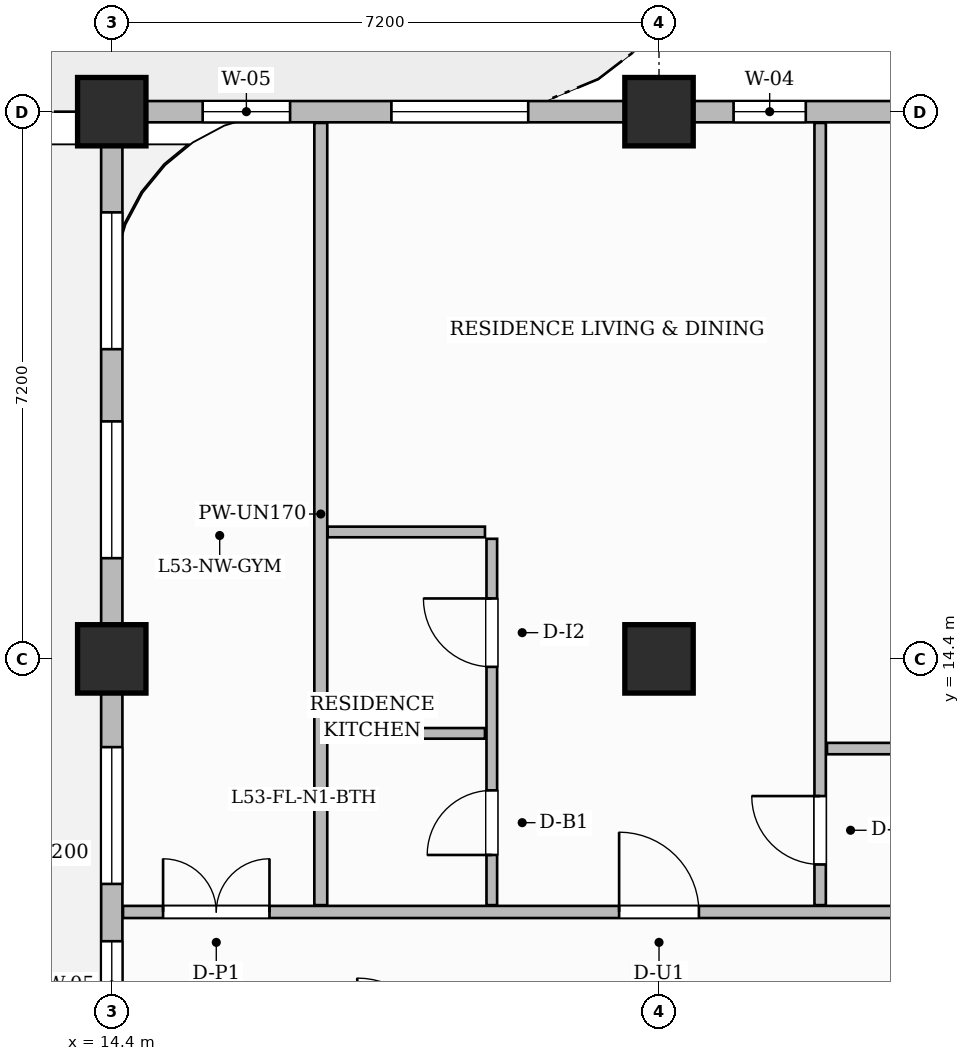
"""IFC4 building model, lengths in metres.
Left out: names, types, materials, properties, quantities, classifications, styles, units other than length and angle.
Written with IfcOpenShell. Run it as: python <this file> out.ifc"""

import sys

from ifc_helpers import new_model, si_unit, direction, frame, frame_2d, origin, origin_2d, place, context, subcontext, project, spatial, rectangle, extrude, source, transform, mapped, element, fill, save


model = new_model("IFC4")
c1 = context("Model", 3, precision=1e-05, world=origin(), true_north=direction((0.0, 1.0)))
c2 = subcontext(c1, "Body", "Model", "MODEL_VIEW")
j1 = project(units=[si_unit("LENGTHUNIT", "METRE"), si_unit("PLANEANGLEUNIT", "RADIAN")], contexts=[c1])
p1 = place(None, origin())
s1 = spatial("IfcSite", under=j1, at=p1, CompositionType="ELEMENT")
p2 = place(p1, origin())
s2 = spatial("IfcBuilding", under=s1, at=p2, CompositionType="ELEMENT")
p3 = place(p2, frame((0.0, 0.0, 213.45)))
s3 = spatial("IfcBuildingStorey", under=s2, at=p3, CompositionType="ELEMENT", Elevation=213.45)
m1 = source(origin(), c2, "Body", "SweptSolid", [
    extrude(rectangle(XDim=0.9, YDim=0.9, at=origin_2d()), origin(), (0.0, 0.0, 1.0), 3.85),
])
for number, where, z_axis, x_axis in (
    (1, (14.4, 14.4, 0.0), (0.0, 0.0, 1.0), (1.0, 0.0, 0.0)),
    (2, (14.4, 21.6, 0.0), (0.0, 0.0, 1.0), (1.0, 0.0, 0.0)),
    (3, (21.6, 14.4, 0.0), (0.0, 0.0, 1.0), (1.0, 0.0, 0.0)),
    (4, (21.6, 21.6, 0.0), (0.0, 0.0, 1.0), (1.0, 0.0, 0.0)),
):
    element("IfcColumn", number, at=place(p3, frame(where, z_axis=z_axis, x_axis=x_axis)), inside=s3, PredefinedType="COLUMN", context=c2, shape_type="MappedRepresentation", body=[
        mapped(m1, transform((0.0, 0.0, 0.0), scale=1.0)),
    ])
p4 = place(p3, frame((14.548, 11.07, 0.0), z_axis=(0.0, 0.0, 1.0), x_axis=(1.0, 0.0, 0.0)))
e5 = element("IfcWall", 5, at=p4, inside=s3, PredefinedType="PARTITIONING", context=c2, shape_type="SweptSolid", body=[
    extrude(rectangle(XDim=15.562, YDim=0.16, at=frame_2d((7.781, 0.0))), origin(), (0.0, 0.0, 1.0), 3.6),
])
p5 = place(p4, frame((0.527, 0.0, 0.0)))
e6 = element("IfcOpeningElement", 6, at=p5, cuts=e5, PredefinedType="OPENING", context=c2, shape_type="SweptSolid", body=[
    extrude(rectangle(XDim=1.4, YDim=2.35, at=frame_2d((0.7, 1.175))), frame((0.0, 0.09, 0.0), z_axis=(0.0, -1.0, 0.0), x_axis=(1.0, 0.0, 0.0)), (0.0, 0.0, 1.0), 0.18),
])
p6 = place(p4, frame((6.527, 0.0, 0.0)))
e7 = element("IfcOpeningElement", 7, at=p6, cuts=e5, PredefinedType="OPENING", context=c2, shape_type="SweptSolid", body=[
    extrude(rectangle(XDim=1.05, YDim=2.25, at=frame_2d((0.525, 1.125))), frame((0.0, 0.09, 0.0), z_axis=(0.0, -1.0, 0.0), x_axis=(1.0, 0.0, 0.0)), (0.0, 0.0, 1.0), 0.18),
])
p7 = place(p3, frame((17.15, 11.16, 0.0), z_axis=(0.0, 0.0, 1.0), x_axis=(0.0, 1.0, 0.0)))
e8 = element("IfcWall", 8, at=p7, inside=s3, PredefinedType="PARTITIONING", context=c2, shape_type="SweptSolid", body=[
    extrude(rectangle(XDim=10.292, YDim=0.17, at=frame_2d((5.146, 0.0))), origin(), (0.0, 0.0, 1.0), 3.6),
])
p8 = place(p3, frame((19.4, 11.16, 0.0), z_axis=(0.0, 0.0, 1.0), x_axis=(0.0, 1.0, 0.0)))
e9 = element("IfcWall", 9, at=p8, inside=s3, PredefinedType="PARTITIONING", context=c2, shape_type="SweptSolid", body=[
    extrude(rectangle(XDim=4.82, YDim=0.14, at=frame_2d((2.41, 0.0))), origin(), (0.0, 0.0, 1.0), 3.6),
])
p9 = place(p8, frame((0.66, 0.0, 0.0)))
e10 = element("IfcOpeningElement", 10, at=p9, cuts=e9, PredefinedType="OPENING", context=c2, shape_type="SweptSolid", body=[
    extrude(rectangle(XDim=0.85, YDim=2.1, at=frame_2d((0.425, 1.05))), frame((0.0, 0.08, 0.0), z_axis=(0.0, -1.0, 0.0), x_axis=(1.0, 0.0, 0.0)), (0.0, 0.0, 1.0), 0.16),
])
p10 = place(p8, frame((3.135, 0.0, 0.0)))
e11 = element("IfcOpeningElement", 11, at=p10, cuts=e9, PredefinedType="OPENING", context=c2, shape_type="SweptSolid", body=[
    extrude(rectangle(XDim=0.9, YDim=2.15, at=frame_2d((0.45, 1.075))), frame((0.0, 0.08, 0.0), z_axis=(0.0, -1.0, 0.0), x_axis=(1.0, 0.0, 0.0)), (0.0, 0.0, 1.0), 0.16),
])
for number, where, z_axis, x_axis in (
    (12, (17.24, 13.42, 0.0), (0.0, 0.0, 1.0), (1.0, 0.0, 0.0)),
    (13, (17.24, 16.07, 0.0), (0.0, 0.0, 1.0), (1.0, 0.0, 0.0)),
):
    element("IfcWall", number, at=place(p3, frame(where, z_axis=z_axis, x_axis=x_axis)), inside=s3, PredefinedType="PARTITIONING", context=c2, shape_type="SweptSolid", body=[
        extrude(rectangle(XDim=2.07, YDim=0.14, at=frame_2d((1.035, 0.0))), origin(), (0.0, 0.0, 1.0), 3.6),
    ])
p11 = place(p3, frame((23.72, 11.16, 0.0), z_axis=(0.0, 0.0, 1.0), x_axis=(0.0, 1.0, 0.0)))
e14 = element("IfcWall", 14, at=p11, inside=s3, PredefinedType="PARTITIONING", context=c2, shape_type="SweptSolid", body=[
    extrude(rectangle(XDim=10.292, YDim=0.15, at=frame_2d((5.146, 0.0))), origin(), (0.0, 0.0, 1.0), 3.6),
])
p12 = place(p11, frame((0.535, 0.0, 0.0)))
e15 = element("IfcOpeningElement", 15, at=p12, cuts=e14, PredefinedType="OPENING", context=c2, shape_type="SweptSolid", body=[
    extrude(rectangle(XDim=0.9, YDim=2.15, at=frame_2d((0.45, 1.075))), frame((0.0, 0.085, 0.0), z_axis=(0.0, -1.0, 0.0), x_axis=(1.0, 0.0, 0.0)), (0.0, 0.0, 1.0), 0.17),
])
p13 = place(p3, frame((23.81, 13.22, 0.0), z_axis=(0.0, 0.0, 1.0), x_axis=(1.0, 0.0, 0.0)))
e16 = element("IfcWall", 16, at=p13, inside=s3, PredefinedType="PARTITIONING", context=c2, shape_type="SweptSolid", body=[
    extrude(rectangle(XDim=6.3, YDim=0.15, at=frame_2d((3.15, 0.0))), origin(), (0.0, 0.0, 1.0), 3.6),
])
p14 = place(p13, frame((1.65, 0.0, 0.0)))
e17 = element("IfcOpeningElement", 17, at=p14, cuts=e16, PredefinedType="OPENING", context=c2, shape_type="SweptSolid", body=[
    extrude(rectangle(XDim=0.9, YDim=2.15, at=frame_2d((0.45, 1.075))), frame((0.0, 0.085, 0.0), z_axis=(0.0, -1.0, 0.0), x_axis=(1.0, 0.0, 0.0)), (0.0, 0.0, 1.0), 0.17),
])
p15 = place(p3, frame((14.4, 21.6, 0.0), z_axis=(0.0, 0.0, 1.0), x_axis=(1.0, 0.0, 0.0)))
e18 = element("IfcWall", 18, at=p15, inside=s3, PredefinedType="SOLIDWALL", context=c2, shape_type="SweptSolid", body=[
    extrude(rectangle(XDim=35.4, YDim=0.28, at=frame_2d((17.7, 0.0))), origin(), (0.0, 0.0, 1.0), 3.135),
])
p16 = place(p15, frame((1.196, 0.0, 0.8)))
e19 = element("IfcOpeningElement", 19, at=p16, cuts=e18, PredefinedType="OPENING", context=c2, shape_type="SweptSolid", body=[
    extrude(rectangle(XDim=1.15, YDim=1.8, at=frame_2d((0.575, 0.9))), frame((0.0, 0.15, 0.0), z_axis=(0.0, -1.0, 0.0), x_axis=(1.0, 0.0, 0.0)), (0.0, 0.0, 1.0), 0.3),
])
p17 = place(p15, frame((3.679, 0.0, 0.8)))
e20 = element("IfcOpeningElement", 20, at=p17, cuts=e18, PredefinedType="OPENING", context=c2, shape_type="SweptSolid", body=[
    extrude(rectangle(XDim=1.8, YDim=1.85, at=frame_2d((0.9, 0.925))), frame((0.0, 0.15, 0.0), z_axis=(0.0, -1.0, 0.0), x_axis=(1.0, 0.0, 0.0)), (0.0, 0.0, 1.0), 0.3),
])
p18 = place(p15, frame((8.181, 0.0, 0.8)))
e21 = element("IfcOpeningElement", 21, at=p18, cuts=e18, PredefinedType="OPENING", context=c2, shape_type="SweptSolid", body=[
    extrude(rectangle(XDim=0.95, YDim=1.75, at=frame_2d((0.475, 0.875))), frame((0.0, 0.15, 0.0), z_axis=(0.0, -1.0, 0.0), x_axis=(1.0, 0.0, 0.0)), (0.0, 0.0, 1.0), 0.3),
])
p19 = place(p15, frame((10.564, 0.0, 0.8)))
e22 = element("IfcOpeningElement", 22, at=p19, cuts=e18, PredefinedType="OPENING", context=c2, shape_type="SweptSolid", body=[
    extrude(rectangle(XDim=1.8, YDim=1.85, at=frame_2d((0.9, 0.925))), frame((0.0, 0.15, 0.0), z_axis=(0.0, -1.0, 0.0), x_axis=(1.0, 0.0, 0.0)), (0.0, 0.0, 1.0), 0.3),
])
p20 = place(p15, frame((16.551, 0.0, 0.8)))
e23 = element("IfcOpeningElement", 23, at=p20, cuts=e18, PredefinedType="OPENING", context=c2, shape_type="SweptSolid", body=[
    extrude(rectangle(XDim=1.8, YDim=1.85, at=frame_2d((0.9, 0.925))), frame((0.0, 0.15, 0.0), z_axis=(0.0, -1.0, 0.0), x_axis=(1.0, 0.0, 0.0)), (0.0, 0.0, 1.0), 0.3),
])
p21 = place(p15, frame((22.196, 0.0, 0.8)))
e24 = element("IfcOpeningElement", 24, at=p21, cuts=e18, PredefinedType="OPENING", context=c2, shape_type="SweptSolid", body=[
    extrude(rectangle(XDim=1.8, YDim=1.85, at=frame_2d((0.9, 0.925))), frame((0.0, 0.15, 0.0), z_axis=(0.0, -1.0, 0.0), x_axis=(1.0, 0.0, 0.0)), (0.0, 0.0, 1.0), 0.3),
])
p22 = place(p15, frame((25.329, 0.0, 0.8)))
e25 = element("IfcOpeningElement", 25, at=p22, cuts=e18, PredefinedType="OPENING", context=c2, shape_type="SweptSolid", body=[
    extrude(rectangle(XDim=1.15, YDim=1.8, at=frame_2d((0.575, 0.9))), frame((0.0, 0.15, 0.0), z_axis=(0.0, -1.0, 0.0), x_axis=(1.0, 0.0, 0.0)), (0.0, 0.0, 1.0), 0.3),
])
p23 = place(p15, frame((28.721, 0.0, 0.8)))
e26 = element("IfcOpeningElement", 26, at=p23, cuts=e18, PredefinedType="OPENING", context=c2, shape_type="SweptSolid", body=[
    extrude(rectangle(XDim=0.95, YDim=1.75, at=frame_2d((0.475, 0.875))), frame((0.0, 0.15, 0.0), z_axis=(0.0, -1.0, 0.0), x_axis=(1.0, 0.0, 0.0)), (0.0, 0.0, 1.0), 0.3),
])
p24 = place(p15, frame((31.404, 0.0, 0.8)))
e27 = element("IfcOpeningElement", 27, at=p24, cuts=e18, PredefinedType="OPENING", context=c2, shape_type="SweptSolid", body=[
    extrude(rectangle(XDim=1.8, YDim=1.85, at=frame_2d((0.9, 0.925))), frame((0.0, 0.15, 0.0), z_axis=(0.0, -1.0, 0.0), x_axis=(1.0, 0.0, 0.0)), (0.0, 0.0, 1.0), 0.3),
])
p25 = place(p3, frame((14.4, 0.05, 0.0), z_axis=(0.0, 0.0, 1.0), x_axis=(0.0, 1.0, 0.0)))
e28 = element("IfcWall", 28, at=p25, inside=s3, PredefinedType="SOLIDWALL", context=c2, shape_type="SweptSolid", body=[
    extrude(rectangle(XDim=21.5, YDim=0.28, at=frame_2d((10.75, 0.0))), origin(), (0.0, 0.0, 1.0), 3.135),
])
p26 = place(p25, frame((2.75, 0.0, 0.0)))
e29 = element("IfcOpeningElement", 29, at=p26, cuts=e28, PredefinedType="OPENING", context=c2, shape_type="SweptSolid", body=[
    extrude(rectangle(XDim=1.2, YDim=2.2, at=frame_2d((0.6, 1.1))), frame((0.0, 0.15, 0.0), z_axis=(0.0, -1.0, 0.0), x_axis=(1.0, 0.0, 0.0)), (0.0, 0.0, 1.0), 0.3),
])
p27 = place(p25, frame((1.025, 0.0, 0.8)))
e30 = element("IfcOpeningElement", 30, at=p27, cuts=e28, PredefinedType="OPENING", context=c2, shape_type="SweptSolid", body=[
    extrude(rectangle(XDim=1.15, YDim=1.8, at=frame_2d((0.575, 0.9))), frame((0.0, 0.15, 0.0), z_axis=(0.0, -1.0, 0.0), x_axis=(1.0, 0.0, 0.0)), (0.0, 0.0, 1.0), 0.3),
])
p28 = place(p25, frame((4.6, 0.0, 0.8)))
e31 = element("IfcOpeningElement", 31, at=p28, cuts=e28, PredefinedType="OPENING", context=c2, shape_type="SweptSolid", body=[
    extrude(rectangle(XDim=1.4, YDim=1.85, at=frame_2d((0.7, 0.925))), frame((0.0, 0.15, 0.0), z_axis=(0.0, -1.0, 0.0), x_axis=(1.0, 0.0, 0.0)), (0.0, 0.0, 1.0), 0.3),
])
p29 = place(p25, frame((9.485, 0.0, 0.8)))
e32 = element("IfcOpeningElement", 32, at=p29, cuts=e28, PredefinedType="OPENING", context=c2, shape_type="SweptSolid", body=[
    extrude(rectangle(XDim=1.15, YDim=1.8, at=frame_2d((0.575, 0.9))), frame((0.0, 0.15, 0.0), z_axis=(0.0, -1.0, 0.0), x_axis=(1.0, 0.0, 0.0)), (0.0, 0.0, 1.0), 0.3),
])
p30 = place(p25, frame((11.389, 0.0, 0.8)))
e33 = element("IfcOpeningElement", 33, at=p30, cuts=e28, PredefinedType="OPENING", context=c2, shape_type="SweptSolid", body=[
    extrude(rectangle(XDim=1.8, YDim=1.85, at=frame_2d((0.9, 0.925))), frame((0.0, 0.15, 0.0), z_axis=(0.0, -1.0, 0.0), x_axis=(1.0, 0.0, 0.0)), (0.0, 0.0, 1.0), 0.3),
])
p31 = place(p25, frame((15.675, 0.0, 0.8)))
e34 = element("IfcOpeningElement", 34, at=p31, cuts=e28, PredefinedType="OPENING", context=c2, shape_type="SweptSolid", body=[
    extrude(rectangle(XDim=1.8, YDim=1.85, at=frame_2d((0.9, 0.925))), frame((0.0, 0.15, 0.0), z_axis=(0.0, -1.0, 0.0), x_axis=(1.0, 0.0, 0.0)), (0.0, 0.0, 1.0), 0.3),
])
p32 = place(p25, frame((18.425, 0.0, 0.8)))
e35 = element("IfcOpeningElement", 35, at=p32, cuts=e28, PredefinedType="OPENING", context=c2, shape_type="SweptSolid", body=[
    extrude(rectangle(XDim=1.8, YDim=1.85, at=frame_2d((0.9, 0.925))), frame((0.0, 0.15, 0.0), z_axis=(0.0, -1.0, 0.0), x_axis=(1.0, 0.0, 0.0)), (0.0, 0.0, 1.0), 0.3),
])
m2 = source(origin(), c2, "Body", "SweptSolid", [
    extrude(rectangle(XDim=1.4, YDim=2.35, at=frame_2d((0.7, 1.175))), frame((0.0, 0.025, 0.0), z_axis=(0.0, -1.0, 0.0), x_axis=(1.0, 0.0, 0.0)), (0.0, 0.0, 1.0), 0.05),
])
p33 = place(p5, origin())
e36 = element("IfcDoor", 36, at=p33, inside=s3, OperationType="DOUBLE_DOOR_SINGLE_SWING", PredefinedType="DOOR", context=c2, shape_type="MappedRepresentation", body=[
    mapped(m2, transform((0.0, 0.0, 0.0), scale=1.0)),
])
fill(e6, e36)
m3 = source(origin(), c2, "Body", "SweptSolid", [
    extrude(rectangle(XDim=0.85, YDim=2.1, at=frame_2d((0.425, 1.05))), frame((0.0, 0.025, 0.0), z_axis=(0.0, -1.0, 0.0), x_axis=(1.0, 0.0, 0.0)), (0.0, 0.0, 1.0), 0.05),
])
p34 = place(p9, origin())
e37 = element("IfcDoor", 37, at=p34, inside=s3, OperationType="SINGLE_SWING_LEFT", PredefinedType="DOOR", context=c2, shape_type="MappedRepresentation", body=[
    mapped(m3, transform((0.0, 0.0, 0.0), scale=1.0)),
])
fill(e10, e37)
m4 = source(origin(), c2, "Body", "SweptSolid", [
    extrude(rectangle(XDim=0.9, YDim=2.15, at=frame_2d((0.45, 1.075))), frame((0.0, 0.025, 0.0), z_axis=(0.0, -1.0, 0.0), x_axis=(1.0, 0.0, 0.0)), (0.0, 0.0, 1.0), 0.05),
])
p35 = place(p10, origin())
e38 = element("IfcDoor", 38, at=p35, inside=s3, OperationType="SINGLE_SWING_RIGHT", PredefinedType="DOOR", context=c2, shape_type="MappedRepresentation", body=[
    mapped(m4, transform((0.0, 0.0, 0.0), scale=1.0)),
])
fill(e11, e38)
m5 = source(origin(), c2, "Body", "SweptSolid", [
    extrude(rectangle(XDim=1.05, YDim=2.25, at=frame_2d((0.525, 1.125))), frame((0.0, 0.025, 0.0), z_axis=(0.0, -1.0, 0.0), x_axis=(1.0, 0.0, 0.0)), (0.0, 0.0, 1.0), 0.05),
])
p36 = place(p6, origin())
e39 = element("IfcDoor", 39, at=p36, inside=s3, OperationType="SINGLE_SWING_LEFT", PredefinedType="DOOR", context=c2, shape_type="MappedRepresentation", body=[
    mapped(m5, transform((0.0, 0.0, 0.0), scale=1.0)),
])
fill(e7, e39)
p37 = place(p12, origin())
e40 = element("IfcDoor", 40, at=p37, inside=s3, OperationType="SINGLE_SWING_RIGHT", PredefinedType="DOOR", context=c2, shape_type="MappedRepresentation", body=[
    mapped(m4, transform((0.0, 0.0, 0.0), scale=1.0)),
])
fill(e15, e40)
m6 = source(origin(), c2, "Body", "SweptSolid", [
    extrude(rectangle(XDim=1.15, YDim=1.8, at=frame_2d((0.575, 0.9))), frame((0.0, 0.03, 0.0), z_axis=(0.0, -1.0, 0.0), x_axis=(1.0, 0.0, 0.0)), (0.0, 0.0, 1.0), 0.06),
])
p38 = place(p16, origin())
e41 = element("IfcWindow", 41, at=p38, inside=s3, PartitioningType="SINGLE_PANEL", PredefinedType="WINDOW", context=c2, shape_type="MappedRepresentation", body=[
    mapped(m6, transform((0.0, 0.0, 0.0), scale=1.0)),
])
fill(e19, e41)
m7 = source(origin(), c2, "Body", "SweptSolid", [
    extrude(rectangle(XDim=1.8, YDim=1.85, at=frame_2d((0.9, 0.925))), frame((0.0, 0.03, 0.0), z_axis=(0.0, -1.0, 0.0), x_axis=(1.0, 0.0, 0.0)), (0.0, 0.0, 1.0), 0.06),
])
p39 = place(p17, origin())
e42 = element("IfcWindow", 42, at=p39, inside=s3, PartitioningType="DOUBLE_PANEL_VERTICAL", PredefinedType="WINDOW", context=c2, shape_type="MappedRepresentation", body=[
    mapped(m7, transform((0.0, 0.0, 0.0), scale=1.0)),
])
fill(e20, e42)
m8 = source(origin(), c2, "Body", "SweptSolid", [
    extrude(rectangle(XDim=0.95, YDim=1.75, at=frame_2d((0.475, 0.875))), frame((0.0, 0.03, 0.0), z_axis=(0.0, -1.0, 0.0), x_axis=(1.0, 0.0, 0.0)), (0.0, 0.0, 1.0), 0.06),
])
p40 = place(p18, origin())
e43 = element("IfcWindow", 43, at=p40, inside=s3, PartitioningType="SINGLE_PANEL", PredefinedType="WINDOW", context=c2, shape_type="MappedRepresentation", body=[
    mapped(m8, transform((0.0, 0.0, 0.0), scale=1.0)),
])
fill(e21, e43)
p41 = place(p29, origin())
e44 = element("IfcWindow", 44, at=p41, inside=s3, PartitioningType="SINGLE_PANEL", PredefinedType="WINDOW", context=c2, shape_type="MappedRepresentation", body=[
    mapped(m6, transform((0.0, 0.0, 0.0), scale=1.0)),
])
fill(e32, e44)
p42 = place(p30, origin())
e45 = element("IfcWindow", 45, at=p42, inside=s3, PartitioningType="DOUBLE_PANEL_VERTICAL", PredefinedType="WINDOW", context=c2, shape_type="MappedRepresentation", body=[
    mapped(m7, transform((0.0, 0.0, 0.0), scale=1.0)),
])
fill(e33, e45)
p43 = place(p31, origin())
e46 = element("IfcWindow", 46, at=p43, inside=s3, PartitioningType="DOUBLE_PANEL_VERTICAL", PredefinedType="WINDOW", context=c2, shape_type="MappedRepresentation", body=[
    mapped(m7, transform((0.0, 0.0, 0.0), scale=1.0)),
])
fill(e34, e46)
p44 = place(p32, origin())
e47 = element("IfcWindow", 47, at=p44, inside=s3, PartitioningType="DOUBLE_PANEL_VERTICAL", PredefinedType="WINDOW", context=c2, shape_type="MappedRepresentation", body=[
    mapped(m7, transform((0.0, 0.0, 0.0), scale=1.0)),
])
fill(e35, e47)
save(model, sys.argv[1])
